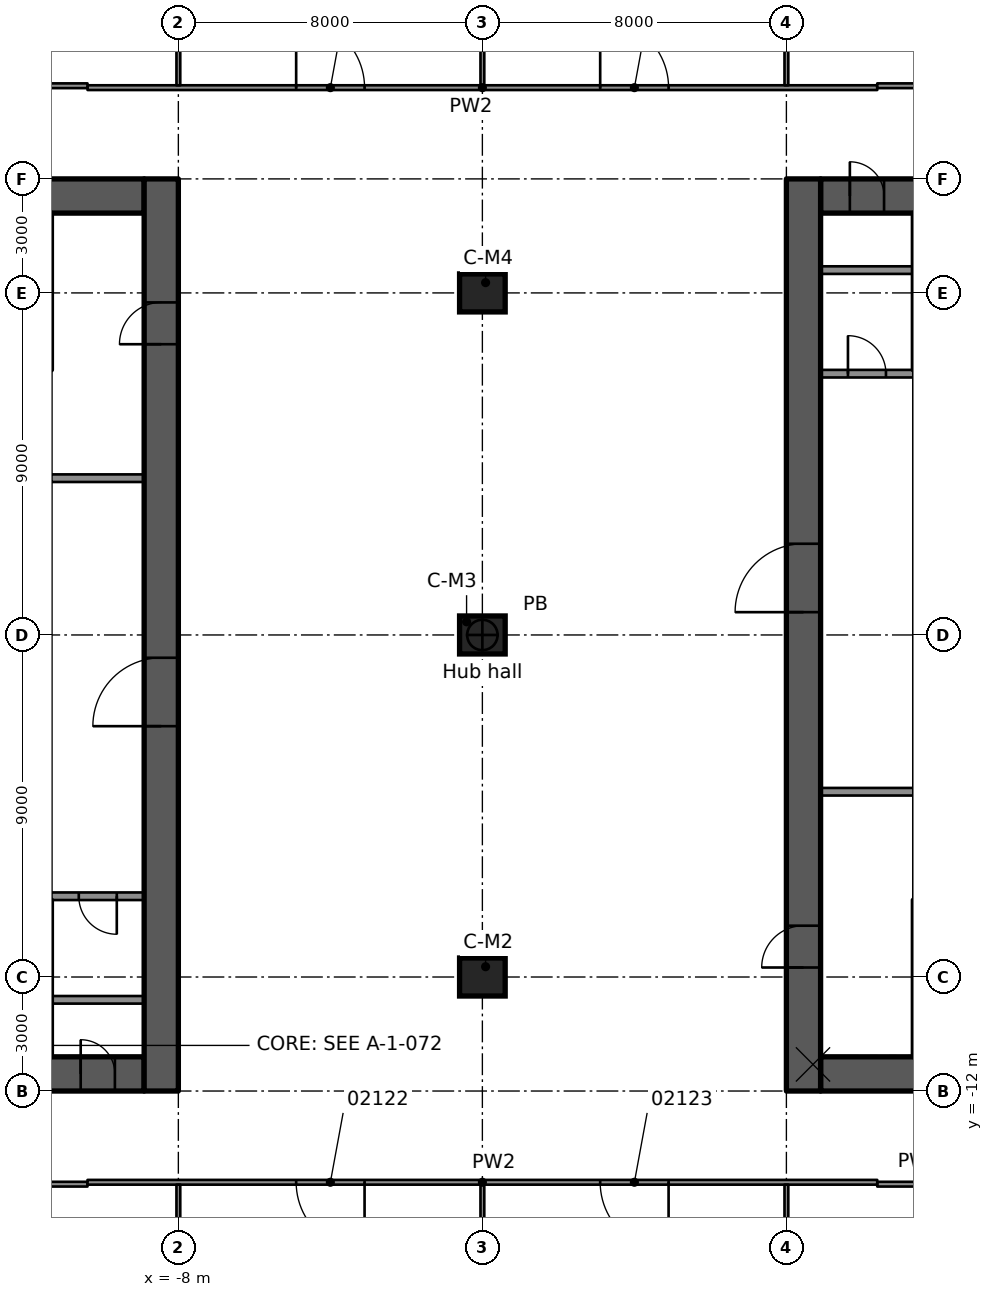
"""IFC4 building model, lengths in metres.
Left out: names, types, materials, properties, quantities, classifications, styles, units other than length and angle.
Written with IfcOpenShell. Run it as: python <this file> out.ifc"""

import sys

from ifc_helpers import new_model, si_unit, direction, frame, frame_2d, origin, origin_2d, place, context, subcontext, project, spatial, rectangle, extrude, element, fill, save


model = new_model("IFC4")
c1 = context("Model", 3, precision=1e-05, world=origin(), true_north=direction((0.0, 1.0)))
c2 = subcontext(c1, "Body", "Model", "MODEL_VIEW")
j1 = project(units=[si_unit("LENGTHUNIT", "METRE"), si_unit("PLANEANGLEUNIT", "RADIAN")], contexts=[c1])
p1 = place(None, origin())
s1 = spatial("IfcSite", under=j1, at=p1, CompositionType="ELEMENT")
p2 = place(p1, origin())
s2 = spatial("IfcBuilding", under=s1, at=p2, CompositionType="ELEMENT")
p3 = place(p2, frame((0.0, 0.0, 10.5)))
s3 = spatial("IfcBuildingStorey", under=s2, at=p3, CompositionType="ELEMENT", Elevation=10.5)
p4 = place(p3, frame((-18.1, 11.55, 0.0), z_axis=(0.0, 0.0, 1.0), x_axis=(1.0, 0.0, 0.0)))
e1 = element("IfcWall", 1, at=p4, inside=s3, PredefinedType="SHEAR", context=c2, shape_type="SweptSolid", body=[
    extrude(rectangle(XDim=9.2, YDim=0.9, at=frame_2d((4.6, 0.0))), origin(), (0.0, 0.0, 1.0), 5.0),
])
p5 = place(p4, frame((5.1, 0.0, 0.0)))
e2 = element("IfcOpeningElement", 2, at=p5, cuts=e1, PredefinedType="OPENING", context=c2, shape_type="SweptSolid", body=[
    extrude(rectangle(XDim=1.1, YDim=2.1, at=frame_2d((0.55, 1.05))), frame((0.0, 0.46, 0.0), z_axis=(0.0, -1.0, 0.0), x_axis=(1.0, 0.0, 0.0)), (0.0, 0.0, 1.0), 0.92),
])
p6 = place(p3, frame((-18.1, -11.55, 0.0), z_axis=(0.0, 0.0, 1.0), x_axis=(1.0, 0.0, 0.0)))
e3 = element("IfcWall", 3, at=p6, inside=s3, PredefinedType="SHEAR", context=c2, shape_type="SweptSolid", body=[
    extrude(rectangle(XDim=9.2, YDim=0.9, at=frame_2d((4.6, 0.0))), origin(), (0.0, 0.0, 1.0), 5.0),
])
p7 = place(p6, frame((5.1, 0.0, 0.0)))
e4 = element("IfcOpeningElement", 4, at=p7, cuts=e3, PredefinedType="OPENING", context=c2, shape_type="SweptSolid", body=[
    extrude(rectangle(XDim=1.1, YDim=2.1, at=frame_2d((0.55, 1.05))), frame((0.0, 0.46, 0.0), z_axis=(0.0, -1.0, 0.0), x_axis=(1.0, 0.0, 0.0)), (0.0, 0.0, 1.0), 0.92),
])
p8 = place(p6, frame((7.53, 0.0, 0.0)))
e5 = element("IfcOpeningElement", 5, at=p8, cuts=e3, PredefinedType="OPENING", context=c2, shape_type="SweptSolid", body=[
    extrude(rectangle(XDim=0.9, YDim=2.1, at=frame_2d((0.45, 1.05))), frame((0.0, 0.46, 0.0), z_axis=(0.0, -1.0, 0.0), x_axis=(1.0, 0.0, 0.0)), (0.0, 0.0, 1.0), 0.92),
])
p9 = place(p3, frame((-8.45, -12.0, 0.0), z_axis=(0.0, 0.0, 1.0), x_axis=(0.0, 1.0, 0.0)))
e6 = element("IfcWall", 6, at=p9, inside=s3, PredefinedType="SHEAR", context=c2, shape_type="SweptSolid", body=[
    extrude(rectangle(XDim=24.0, YDim=0.9, at=frame_2d((12.0, 0.0))), origin(), (0.0, 0.0, 1.0), 5.0),
])
p10 = place(p9, frame((9.6, 0.0, 0.0)))
e7 = element("IfcOpeningElement", 7, at=p10, cuts=e6, PredefinedType="OPENING", context=c2, shape_type="SweptSolid", body=[
    extrude(rectangle(XDim=1.8, YDim=2.1, at=frame_2d((0.9, 1.05))), frame((0.0, 0.46, 0.0), z_axis=(0.0, -1.0, 0.0), x_axis=(1.0, 0.0, 0.0)), (0.0, 0.0, 1.0), 0.92),
])
p11 = place(p9, frame((19.65, 0.0, 0.0)))
e8 = element("IfcOpeningElement", 8, at=p11, cuts=e6, PredefinedType="OPENING", context=c2, shape_type="SweptSolid", body=[
    extrude(rectangle(XDim=1.1, YDim=2.1, at=frame_2d((0.55, 1.05))), frame((0.0, 0.46, 0.0), z_axis=(0.0, -1.0, 0.0), x_axis=(1.0, 0.0, 0.0)), (0.0, 0.0, 1.0), 0.92),
])
p12 = place(p3, frame((8.9, 11.55, 0.0), z_axis=(0.0, 0.0, 1.0), x_axis=(1.0, 0.0, 0.0)))
e9 = element("IfcWall", 9, at=p12, inside=s3, PredefinedType="SHEAR", context=c2, shape_type="SweptSolid", body=[
    extrude(rectangle(XDim=9.2, YDim=0.9, at=frame_2d((4.6, 0.0))), origin(), (0.0, 0.0, 1.0), 5.0),
])
p13 = place(p12, frame((3.0, 0.0, 0.0)))
e10 = element("IfcOpeningElement", 10, at=p13, cuts=e9, PredefinedType="OPENING", context=c2, shape_type="SweptSolid", body=[
    extrude(rectangle(XDim=1.1, YDim=2.1, at=frame_2d((0.55, 1.05))), frame((0.0, 0.46, 0.0), z_axis=(0.0, -1.0, 0.0), x_axis=(1.0, 0.0, 0.0)), (0.0, 0.0, 1.0), 0.92),
])
p14 = place(p12, frame((0.77, 0.0, 0.0)))
e11 = element("IfcOpeningElement", 11, at=p14, cuts=e9, PredefinedType="OPENING", context=c2, shape_type="SweptSolid", body=[
    extrude(rectangle(XDim=0.9, YDim=2.1, at=frame_2d((0.45, 1.05))), frame((0.0, 0.46, 0.0), z_axis=(0.0, -1.0, 0.0), x_axis=(1.0, 0.0, 0.0)), (0.0, 0.0, 1.0), 0.92),
])
p15 = place(p3, frame((8.9, -11.55, 0.0), z_axis=(0.0, 0.0, 1.0), x_axis=(1.0, 0.0, 0.0)))
e12 = element("IfcWall", 12, at=p15, inside=s3, PredefinedType="SHEAR", context=c2, shape_type="SweptSolid", body=[
    extrude(rectangle(XDim=9.2, YDim=0.9, at=frame_2d((4.6, 0.0))), origin(), (0.0, 0.0, 1.0), 5.0),
])
p16 = place(p15, frame((3.0, 0.0, 0.0)))
e13 = element("IfcOpeningElement", 13, at=p16, cuts=e12, PredefinedType="OPENING", context=c2, shape_type="SweptSolid", body=[
    extrude(rectangle(XDim=1.1, YDim=2.1, at=frame_2d((0.55, 1.05))), frame((0.0, 0.46, 0.0), z_axis=(0.0, -1.0, 0.0), x_axis=(1.0, 0.0, 0.0)), (0.0, 0.0, 1.0), 0.92),
])
p17 = place(p3, frame((8.45, -12.0, 0.0), z_axis=(0.0, 0.0, 1.0), x_axis=(0.0, 1.0, 0.0)))
e14 = element("IfcWall", 14, at=p17, inside=s3, PredefinedType="SHEAR", context=c2, shape_type="SweptSolid", body=[
    extrude(rectangle(XDim=24.0, YDim=0.9, at=frame_2d((12.0, 0.0))), origin(), (0.0, 0.0, 1.0), 5.0),
])
p18 = place(p17, frame((12.6, 0.0, 0.0)))
e15 = element("IfcOpeningElement", 15, at=p18, cuts=e14, PredefinedType="OPENING", context=c2, shape_type="SweptSolid", body=[
    extrude(rectangle(XDim=1.8, YDim=2.1, at=frame_2d((0.9, 1.05))), frame((0.0, 0.46, 0.0), z_axis=(0.0, -1.0, 0.0), x_axis=(1.0, 0.0, 0.0)), (0.0, 0.0, 1.0), 0.92),
])
p19 = place(p17, frame((3.25, 0.0, 0.0)))
e16 = element("IfcOpeningElement", 16, at=p19, cuts=e14, PredefinedType="OPENING", context=c2, shape_type="SweptSolid", body=[
    extrude(rectangle(XDim=1.1, YDim=2.1, at=frame_2d((0.55, 1.05))), frame((0.0, 0.46, 0.0), z_axis=(0.0, -1.0, 0.0), x_axis=(1.0, 0.0, 0.0)), (0.0, 0.0, 1.0), 0.92),
])
for number, where, z_axis, x_axis in (
    (17, (0.0, -9.0, 0.0), (0.0, 0.0, 1.0), (1.0, 0.0, 0.0)),
    (18, (0.0, 0.0, 0.0), (0.0, 0.0, 1.0), (1.0, 0.0, 0.0)),
    (19, (0.0, 9.0, 0.0), (0.0, 0.0, 1.0), (1.0, 0.0, 0.0)),
):
    element("IfcColumn", number, at=place(p3, frame(where, z_axis=z_axis, x_axis=x_axis)), inside=s3, PredefinedType="COLUMN", context=c2, shape_type="SweptSolid", body=[
        extrude(rectangle(XDim=1.2, YDim=1.0, at=origin_2d()), origin(), (0.0, 0.0, 1.0), 5.0),
    ])
p20 = place(p3, frame((-8.9, 4.125, 0.0), z_axis=(0.0, 0.0, 1.0), x_axis=(-1.0, 0.0, 0.0)))
e20 = element("IfcWall", 20, at=p20, inside=s3, PredefinedType="PARTITIONING", context=c2, shape_type="SweptSolid", body=[
    extrude(rectangle(XDim=2.44, YDim=0.2, at=frame_2d((1.22, 0.0))), origin(), (0.0, 0.0, 1.0), 4.59),
])
p21 = place(p3, frame((-8.9, -6.875, 0.0), z_axis=(0.0, 0.0, 1.0), x_axis=(-1.0, 0.0, 0.0)))
e21 = element("IfcWall", 21, at=p21, inside=s3, PredefinedType="PARTITIONING", context=c2, shape_type="SweptSolid", body=[
    extrude(rectangle(XDim=2.44, YDim=0.2, at=frame_2d((1.22, 0.0))), origin(), (0.0, 0.0, 1.0), 4.59),
])
p22 = place(p21, frame((0.72, 0.0, 0.0)))
e22 = element("IfcOpeningElement", 22, at=p22, cuts=e21, PredefinedType="OPENING", context=c2, shape_type="SweptSolid", body=[
    extrude(rectangle(XDim=1.0, YDim=2.1, at=frame_2d((0.5, 1.05))), frame((0.0, 0.11, 0.0), z_axis=(0.0, -1.0, 0.0), x_axis=(1.0, 0.0, 0.0)), (0.0, 0.0, 1.0), 0.22),
])
for number, where, z_axis, x_axis in (
    (23, (-8.9, -9.6, 0.0), (0.0, 0.0, 1.0), (-1.0, 0.0, 0.0)),
    (24, (8.9, -4.125, 0.0), (0.0, 0.0, 1.0), (1.0, 0.0, 0.0)),
):
    element("IfcWall", number, at=place(p3, frame(where, z_axis=z_axis, x_axis=x_axis)), inside=s3, PredefinedType="PARTITIONING", context=c2, shape_type="SweptSolid", body=[
        extrude(rectangle(XDim=2.44, YDim=0.2, at=frame_2d((1.22, 0.0))), origin(), (0.0, 0.0, 1.0), 4.59),
    ])
p23 = place(p3, frame((8.9, 6.875, 0.0), z_axis=(0.0, 0.0, 1.0), x_axis=(1.0, 0.0, 0.0)))
e25 = element("IfcWall", 25, at=p23, inside=s3, PredefinedType="PARTITIONING", context=c2, shape_type="SweptSolid", body=[
    extrude(rectangle(XDim=2.44, YDim=0.2, at=frame_2d((1.22, 0.0))), origin(), (0.0, 0.0, 1.0), 4.59),
])
p24 = place(p23, frame((0.72, 0.0, 0.0)))
e26 = element("IfcOpeningElement", 26, at=p24, cuts=e25, PredefinedType="OPENING", context=c2, shape_type="SweptSolid", body=[
    extrude(rectangle(XDim=1.0, YDim=2.1, at=frame_2d((0.5, 1.05))), frame((0.0, 0.11, 0.0), z_axis=(0.0, -1.0, 0.0), x_axis=(1.0, 0.0, 0.0)), (0.0, 0.0, 1.0), 0.22),
])
p25 = place(p3, frame((8.9, 9.6, 0.0), z_axis=(0.0, 0.0, 1.0), x_axis=(1.0, 0.0, 0.0)))
e27 = element("IfcWall", 27, at=p25, inside=s3, PredefinedType="PARTITIONING", context=c2, shape_type="SweptSolid", body=[
    extrude(rectangle(XDim=2.44, YDim=0.2, at=frame_2d((1.22, 0.0))), origin(), (0.0, 0.0, 1.0), 4.59),
])
p26 = place(p3, frame((-17.659, -14.451, 0.0), z_axis=(0.0, 0.0, 1.0), x_axis=(1.0, 0.0, 0.0)))
e28 = element("IfcWall", 28, at=p26, inside=s3, PredefinedType="PARTITIONING", context=c2, shape_type="SweptSolid", body=[
    extrude(rectangle(XDim=7.268, YDim=0.125, at=frame_2d((3.634, 0.0))), origin(), (0.0, 0.0, 1.0), 4.58),
])
p27 = place(p3, frame((10.391, -14.451, 0.0), z_axis=(0.0, 0.0, 1.0), x_axis=(1.0, 0.0, 0.0)))
e29 = element("IfcWall", 29, at=p27, inside=s3, PredefinedType="PARTITIONING", context=c2, shape_type="SweptSolid", body=[
    extrude(rectangle(XDim=2.413, YDim=0.125, at=frame_2d((1.207, 0.0))), origin(), (0.0, 0.0, 1.0), 4.58),
])
p28 = place(p3, frame((10.391, -14.401, 0.0), z_axis=(0.0, 0.0, 1.0), x_axis=(-1.0, 0.0, 0.0)))
e30 = element("IfcWall", 30, at=p28, inside=s3, PredefinedType="PARTITIONING", context=c2, shape_type="SweptSolid", body=[
    extrude(rectangle(XDim=20.781, YDim=0.125, at=frame_2d((10.391, 0.0))), origin(), (0.0, 0.0, 1.0), 4.58),
])
p29 = place(p28, frame((13.491, 0.0, 0.0)))
e31 = element("IfcOpeningElement", 31, at=p29, cuts=e30, PredefinedType="OPENING", context=c2, shape_type="SweptSolid", body=[
    extrude(rectangle(XDim=1.8, YDim=2.1, at=frame_2d((0.9, 1.05))), frame((0.0, 0.073, 0.0), z_axis=(0.0, -1.0, 0.0), x_axis=(1.0, 0.0, 0.0)), (0.0, 0.0, 1.0), 0.145),
])
p30 = place(p28, frame((5.491, 0.0, 0.0)))
e32 = element("IfcOpeningElement", 32, at=p30, cuts=e30, PredefinedType="OPENING", context=c2, shape_type="SweptSolid", body=[
    extrude(rectangle(XDim=1.8, YDim=2.1, at=frame_2d((0.9, 1.05))), frame((0.0, 0.073, 0.0), z_axis=(0.0, -1.0, 0.0), x_axis=(1.0, 0.0, 0.0)), (0.0, 0.0, 1.0), 0.145),
])
p31 = place(p3, frame((-10.39, 14.401, 0.0), z_axis=(0.0, 0.0, 1.0), x_axis=(1.0, 0.0, 0.0)))
e33 = element("IfcWall", 33, at=p31, inside=s3, PredefinedType="PARTITIONING", context=c2, shape_type="SweptSolid", body=[
    extrude(rectangle(XDim=20.781, YDim=0.125, at=frame_2d((10.391, 0.0))), origin(), (0.0, 0.0, 1.0), 4.58),
])
p32 = place(p31, frame((13.49, 0.0, 0.0)))
e34 = element("IfcOpeningElement", 34, at=p32, cuts=e33, PredefinedType="OPENING", context=c2, shape_type="SweptSolid", body=[
    extrude(rectangle(XDim=1.8, YDim=2.1, at=frame_2d((0.9, 1.05))), frame((0.0, 0.073, 0.0), z_axis=(0.0, -1.0, 0.0), x_axis=(1.0, 0.0, 0.0)), (0.0, 0.0, 1.0), 0.145),
])
p33 = place(p31, frame((5.49, 0.0, 0.0)))
e35 = element("IfcOpeningElement", 35, at=p33, cuts=e33, PredefinedType="OPENING", context=c2, shape_type="SweptSolid", body=[
    extrude(rectangle(XDim=1.8, YDim=2.1, at=frame_2d((0.9, 1.05))), frame((0.0, 0.073, 0.0), z_axis=(0.0, -1.0, 0.0), x_axis=(1.0, 0.0, 0.0)), (0.0, 0.0, 1.0), 0.145),
])
p34 = place(p3, frame((-21.387, 14.451, 0.0), z_axis=(0.0, 0.0, 1.0), x_axis=(1.0, 0.0, 0.0)))
e36 = element("IfcWall", 36, at=p34, inside=s3, PredefinedType="PARTITIONING", context=c2, shape_type="SweptSolid", body=[
    extrude(rectangle(XDim=10.996, YDim=0.125, at=frame_2d((5.498, 0.0))), origin(), (0.0, 0.0, 1.0), 4.58),
])
p35 = place(p34, frame((4.538, 0.0, 0.0)))
e37 = element("IfcOpeningElement", 37, at=p35, cuts=e36, PredefinedType="OPENING", context=c2, shape_type="SweptSolid", body=[
    extrude(rectangle(XDim=1.8, YDim=2.1, at=frame_2d((0.9, 1.05))), frame((0.0, 0.073, 0.0), z_axis=(0.0, -1.0, 0.0), x_axis=(1.0, 0.0, 0.0)), (0.0, 0.0, 1.0), 0.145),
])
p36 = place(p3, frame((10.391, 14.451, 0.0), z_axis=(0.0, 0.0, 1.0), x_axis=(1.0, 0.0, 0.0)))
e38 = element("IfcWall", 38, at=p36, inside=s3, PredefinedType="PARTITIONING", context=c2, shape_type="SweptSolid", body=[
    extrude(rectangle(XDim=10.996, YDim=0.125, at=frame_2d((5.498, 0.0))), origin(), (0.0, 0.0, 1.0), 4.58),
])
p37 = place(p36, frame((4.6, 0.0, 0.0)))
e39 = element("IfcOpeningElement", 39, at=p37, cuts=e38, PredefinedType="OPENING", context=c2, shape_type="SweptSolid", body=[
    extrude(rectangle(XDim=1.8, YDim=2.1, at=frame_2d((0.9, 1.05))), frame((0.0, 0.073, 0.0), z_axis=(0.0, -1.0, 0.0), x_axis=(1.0, 0.0, 0.0)), (0.0, 0.0, 1.0), 0.145),
])
p38 = place(p3, frame((8.0, -31.663, 0.0), z_axis=(0.0, 0.0, 1.0), x_axis=(0.0, 1.0, 0.0)))
e40 = element("IfcWall", 40, at=p38, inside=s3, PredefinedType="PARTITIONING", context=c2, shape_type="SweptSolid", body=[
    extrude(rectangle(XDim=17.2, YDim=0.1, at=frame_2d((8.6, 0.0))), origin(), (0.0, 0.0, 1.0), 4.58),
])
for number, where, z_axis, x_axis in (
    (41, (8.0, 14.463, 0.0), (0.0, 0.0, 1.0), (0.0, 1.0, 0.0)),
    (42, (0.0, -30.25, 0.0), (0.0, 0.0, 1.0), (0.0, 1.0, 0.0)),
    (43, (0.0, 14.463, 0.0), (0.0, 0.0, 1.0), (0.0, 1.0, 0.0)),
):
    element("IfcWall", number, at=place(p3, frame(where, z_axis=z_axis, x_axis=x_axis)), inside=s3, PredefinedType="PARTITIONING", context=c2, shape_type="SweptSolid", body=[
        extrude(rectangle(XDim=15.787, YDim=0.1, at=frame_2d((7.894, 0.0))), origin(), (0.0, 0.0, 1.0), 4.58),
    ])
p39 = place(p3, frame((-8.0, -31.663, 0.0), z_axis=(0.0, 0.0, 1.0), x_axis=(0.0, 1.0, 0.0)))
e44 = element("IfcWall", 44, at=p39, inside=s3, PredefinedType="PARTITIONING", context=c2, shape_type="SweptSolid", body=[
    extrude(rectangle(XDim=17.2, YDim=0.1, at=frame_2d((8.6, 0.0))), origin(), (0.0, 0.0, 1.0), 4.58),
])
p40 = place(p3, frame((-8.0, 14.463, 0.0), z_axis=(0.0, 0.0, 1.0), x_axis=(0.0, 1.0, 0.0)))
e45 = element("IfcWall", 45, at=p40, inside=s3, PredefinedType="PARTITIONING", context=c2, shape_type="SweptSolid", body=[
    extrude(rectangle(XDim=15.787, YDim=0.1, at=frame_2d((7.894, 0.0))), origin(), (0.0, 0.0, 1.0), 4.58),
])
p41 = place(p10, origin())
e46 = element("IfcDoor", 46, at=p41, inside=s3, OperationType="SINGLE_SWING_LEFT", PredefinedType="DOOR", context=c2, shape_type="SweptSolid", body=[
    extrude(rectangle(XDim=1.8, YDim=2.1, at=frame_2d((0.9, 1.05))), frame((0.0, 0.025, 0.0), z_axis=(0.0, -1.0, 0.0), x_axis=(1.0, 0.0, 0.0)), (0.0, 0.0, 1.0), 0.05),
])
fill(e7, e46)
p42 = place(p11, origin())
e47 = element("IfcDoor", 47, at=p42, inside=s3, OperationType="SINGLE_SWING_RIGHT", PredefinedType="DOOR", context=c2, shape_type="SweptSolid", body=[
    extrude(rectangle(XDim=1.1, YDim=2.1, at=frame_2d((0.55, 1.05))), frame((0.0, 0.025, 0.0), z_axis=(0.0, -1.0, 0.0), x_axis=(1.0, 0.0, 0.0)), (0.0, 0.0, 1.0), 0.05),
])
fill(e8, e47)
p43 = place(p8, origin())
e48 = element("IfcDoor", 48, at=p43, inside=s3, OperationType="SINGLE_SWING_RIGHT", PredefinedType="DOOR", context=c2, shape_type="SweptSolid", body=[
    extrude(rectangle(XDim=0.9, YDim=2.1, at=frame_2d((0.45, 1.05))), frame((0.0, 0.025, 0.0), z_axis=(0.0, -1.0, 0.0), x_axis=(1.0, 0.0, 0.0)), (0.0, 0.0, 1.0), 0.05),
])
fill(e5, e48)
p44 = place(p22, origin())
e49 = element("IfcDoor", 49, at=p44, inside=s3, OperationType="SINGLE_SWING_RIGHT", PredefinedType="DOOR", context=c2, shape_type="SweptSolid", body=[
    extrude(rectangle(XDim=1.0, YDim=2.1, at=frame_2d((0.5, 1.05))), frame((0.0, 0.025, 0.0), z_axis=(0.0, -1.0, 0.0), x_axis=(1.0, 0.0, 0.0)), (0.0, 0.0, 1.0), 0.05),
])
fill(e22, e49)
p45 = place(p18, origin())
e50 = element("IfcDoor", 50, at=p45, inside=s3, OperationType="SINGLE_SWING_RIGHT", PredefinedType="DOOR", context=c2, shape_type="SweptSolid", body=[
    extrude(rectangle(XDim=1.8, YDim=2.1, at=frame_2d((0.9, 1.05))), frame((0.0, 0.025, 0.0), z_axis=(0.0, -1.0, 0.0), x_axis=(1.0, 0.0, 0.0)), (0.0, 0.0, 1.0), 0.05),
])
fill(e15, e50)
p46 = place(p19, origin())
e51 = element("IfcDoor", 51, at=p46, inside=s3, OperationType="SINGLE_SWING_LEFT", PredefinedType="DOOR", context=c2, shape_type="SweptSolid", body=[
    extrude(rectangle(XDim=1.1, YDim=2.1, at=frame_2d((0.55, 1.05))), frame((0.0, 0.025, 0.0), z_axis=(0.0, -1.0, 0.0), x_axis=(1.0, 0.0, 0.0)), (0.0, 0.0, 1.0), 0.05),
])
fill(e16, e51)
p47 = place(p14, origin())
e52 = element("IfcDoor", 52, at=p47, inside=s3, OperationType="SINGLE_SWING_LEFT", PredefinedType="DOOR", context=c2, shape_type="SweptSolid", body=[
    extrude(rectangle(XDim=0.9, YDim=2.1, at=frame_2d((0.45, 1.05))), frame((0.0, 0.025, 0.0), z_axis=(0.0, -1.0, 0.0), x_axis=(1.0, 0.0, 0.0)), (0.0, 0.0, 1.0), 0.05),
])
fill(e11, e52)
p48 = place(p24, origin())
e53 = element("IfcDoor", 53, at=p48, inside=s3, OperationType="SINGLE_SWING_RIGHT", PredefinedType="DOOR", context=c2, shape_type="SweptSolid", body=[
    extrude(rectangle(XDim=1.0, YDim=2.1, at=frame_2d((0.5, 1.05))), frame((0.0, 0.025, 0.0), z_axis=(0.0, -1.0, 0.0), x_axis=(1.0, 0.0, 0.0)), (0.0, 0.0, 1.0), 0.05),
])
fill(e26, e53)
p49 = place(p29, origin())
e54 = element("IfcDoor", 54, at=p49, inside=s3, OperationType="DOUBLE_DOOR_SINGLE_SWING", PredefinedType="DOOR", context=c2, shape_type="SweptSolid", body=[
    extrude(rectangle(XDim=1.8, YDim=2.1, at=frame_2d((0.9, 1.05))), frame((0.0, 0.025, 0.0), z_axis=(0.0, -1.0, 0.0), x_axis=(1.0, 0.0, 0.0)), (0.0, 0.0, 1.0), 0.05),
])
fill(e31, e54)
p50 = place(p30, origin())
e55 = element("IfcDoor", 55, at=p50, inside=s3, OperationType="DOUBLE_DOOR_SINGLE_SWING", PredefinedType="DOOR", context=c2, shape_type="SweptSolid", body=[
    extrude(rectangle(XDim=1.8, YDim=2.1, at=frame_2d((0.9, 1.05))), frame((0.0, 0.025, 0.0), z_axis=(0.0, -1.0, 0.0), x_axis=(1.0, 0.0, 0.0)), (0.0, 0.0, 1.0), 0.05),
])
fill(e32, e55)
p51 = place(p32, origin())
e56 = element("IfcDoor", 56, at=p51, inside=s3, OperationType="DOUBLE_DOOR_SINGLE_SWING", PredefinedType="DOOR", context=c2, shape_type="SweptSolid", body=[
    extrude(rectangle(XDim=1.8, YDim=2.1, at=frame_2d((0.9, 1.05))), frame((0.0, 0.025, 0.0), z_axis=(0.0, -1.0, 0.0), x_axis=(1.0, 0.0, 0.0)), (0.0, 0.0, 1.0), 0.05),
])
fill(e34, e56)
p52 = place(p33, origin())
e57 = element("IfcDoor", 57, at=p52, inside=s3, OperationType="DOUBLE_DOOR_SINGLE_SWING", PredefinedType="DOOR", context=c2, shape_type="SweptSolid", body=[
    extrude(rectangle(XDim=1.8, YDim=2.1, at=frame_2d((0.9, 1.05))), frame((0.0, 0.025, 0.0), z_axis=(0.0, -1.0, 0.0), x_axis=(1.0, 0.0, 0.0)), (0.0, 0.0, 1.0), 0.05),
])
fill(e35, e57)
save(model, sys.argv[1])
